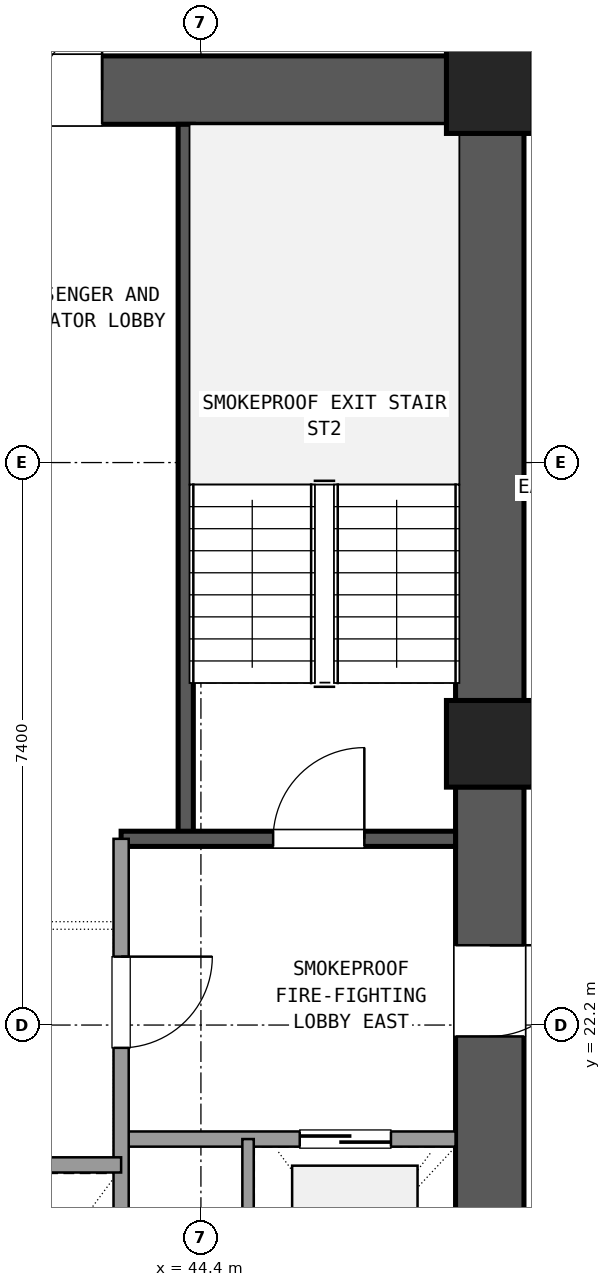
"""IFC4 building model, lengths in metres.
Left out: names, types, materials, properties, quantities, classifications, styles, units other than length and angle.
Written with IfcOpenShell. Run it as: python <this file> out.ifc"""

import sys

from ifc_helpers import new_model, si_unit, direction, frame, frame_2d, origin, origin_2d, place, context, subcontext, project, spatial, rectangle, extrude, element, fill, save


model = new_model("IFC4")
c1 = context("Model", 3, precision=1e-05, world=origin(), true_north=direction((0.0, 1.0)))
c2 = subcontext(c1, "Body", "Model", "MODEL_VIEW")
j1 = project(units=[si_unit("LENGTHUNIT", "METRE"), si_unit("PLANEANGLEUNIT", "RADIAN")], contexts=[c1])
p1 = place(None, origin())
s1 = spatial("IfcSite", under=j1, at=p1, CompositionType="ELEMENT")
p2 = place(p1, origin())
s2 = spatial("IfcBuilding", under=s1, at=p2, CompositionType="ELEMENT")
p3 = place(p2, frame((0.0, 0.0, 52.74)))
s3 = spatial("IfcBuildingStorey", under=s2, at=p3, CompositionType="ELEMENT", Elevation=52.74)
for number, where, z_axis, x_axis in (
    (1, (48.2, 25.9, 0.0), (0.0, 0.0, 1.0), (1.0, 0.0, 0.0)),
    (2, (48.2, 34.5, 0.0), (0.0, 0.0, 1.0), (1.0, 0.0, 0.0)),
):
    element("IfcColumn", number, at=place(p3, frame(where, z_axis=z_axis, x_axis=x_axis)), inside=s3, PredefinedType="COLUMN", context=c2, shape_type="SweptSolid", body=[
        extrude(rectangle(XDim=1.14, YDim=1.14, at=origin_2d()), origin(), (0.0, 0.0, 1.0), 3.6),
    ])
p4 = place(p3, frame((48.2, 17.865, 0.0), z_axis=(0.0, 0.0, 1.0), x_axis=(0.0, 1.0, 0.0)))
e3 = element("IfcWall", 3, at=p4, inside=s3, PredefinedType="SHEAR", context=c2, shape_type="SweptSolid", body=[
    extrude(rectangle(XDim=7.47, YDim=0.9, at=frame_2d((3.735, 0.0))), origin(), (0.0, 0.0, 1.0), 3.32),
])
p5 = place(p4, frame((4.185, 0.0, 0.0)))
e4 = element("IfcOpeningElement", 4, at=p5, cuts=e3, PredefinedType="OPENING", context=c2, shape_type="SweptSolid", body=[
    extrude(rectangle(XDim=1.2, YDim=2.15, at=frame_2d((0.6, 1.075))), frame((0.0, 0.46, 0.0), z_axis=(0.0, -1.0, 0.0), x_axis=(1.0, 0.0, 0.0)), (0.0, 0.0, 1.0), 0.92),
])
p6 = place(p3, frame((48.2, 26.465, 0.0), z_axis=(0.0, 0.0, 1.0), x_axis=(0.0, 1.0, 0.0)))
e5 = element("IfcWall", 5, at=p6, inside=s3, PredefinedType="SHEAR", context=c2, shape_type="SweptSolid", body=[
    extrude(rectangle(XDim=7.47, YDim=0.9, at=frame_2d((3.735, 0.0))), origin(), (0.0, 0.0, 1.0), 3.32),
])
p7 = place(p3, frame((47.635, 34.5, 0.0), z_axis=(0.0, 0.0, 1.0), x_axis=(-1.0, 0.0, 0.0)))
e6 = element("IfcWall", 6, at=p7, inside=s3, PredefinedType="SHEAR", context=c2, shape_type="SweptSolid", body=[
    extrude(rectangle(XDim=10.07, YDim=0.9, at=frame_2d((5.035, 0.0))), origin(), (0.0, 0.0, 1.0), 3.32),
])
p8 = place(p7, frame((4.535, 0.0, 0.0)))
e7 = element("IfcOpeningElement", 7, at=p8, cuts=e6, PredefinedType="OPENING", context=c2, shape_type="SweptSolid", body=[
    extrude(rectangle(XDim=1.6, YDim=2.2, at=frame_2d((0.8, 1.1))), frame((0.0, 0.46, 0.0), z_axis=(0.0, -1.0, 0.0), x_axis=(1.0, 0.0, 0.0)), (0.0, 0.0, 1.0), 0.92),
])
p9 = place(p3, frame((44.2, 24.65, 0.0), z_axis=(0.0, 0.0, 1.0), x_axis=(0.0, 1.0, 0.0)))
e8 = element("IfcWall", 8, at=p9, inside=s3, PredefinedType="SHEAR", context=c2, shape_type="SweptSolid", body=[
    extrude(rectangle(XDim=9.4, YDim=0.2, at=frame_2d((4.7, 0.0))), origin(), (0.0, 0.0, 1.0), 3.32),
])
p10 = place(p3, frame((43.35, 24.65, 0.0), z_axis=(0.0, 0.0, 1.0), x_axis=(1.0, 0.0, 0.0)))
e9 = element("IfcWall", 9, at=p10, inside=s3, PredefinedType="SHEAR", context=c2, shape_type="SweptSolid", body=[
    extrude(rectangle(XDim=4.4, YDim=0.2, at=frame_2d((2.2, 0.0))), origin(), (0.0, 0.0, 1.0), 3.32),
])
p11 = place(p10, frame((2.0, 0.0, 0.0)))
e10 = element("IfcOpeningElement", 10, at=p11, cuts=e9, PredefinedType="OPENING", context=c2, shape_type="SweptSolid", body=[
    extrude(rectangle(XDim=1.2, YDim=2.15, at=frame_2d((0.6, 1.075))), frame((0.0, 0.11, 0.0), z_axis=(0.0, -1.0, 0.0), x_axis=(1.0, 0.0, 0.0)), (0.0, 0.0, 1.0), 0.22),
])
p12 = place(p3, frame((43.35, 20.7, 0.0), z_axis=(0.0, 0.0, 1.0), x_axis=(1.0, 0.0, 0.0)))
e11 = element("IfcWall", 11, at=p12, inside=s3, PredefinedType="SOLIDWALL", context=c2, shape_type="SweptSolid", body=[
    extrude(rectangle(XDim=4.4, YDim=0.2, at=frame_2d((2.2, 0.0))), origin(), (0.0, 0.0, 1.0), 2.61),
])
p13 = place(p12, frame((2.35, 0.0, 0.0)))
e12 = element("IfcOpeningElement", 12, at=p13, cuts=e11, PredefinedType="OPENING", context=c2, shape_type="SweptSolid", body=[
    extrude(rectangle(XDim=1.2, YDim=2.15, at=frame_2d((0.6, 1.075))), frame((0.0, 0.11, 0.0), z_axis=(0.0, -1.0, 0.0), x_axis=(1.0, 0.0, 0.0)), (0.0, 0.0, 1.0), 0.22),
])
p14 = place(p3, frame((43.35, 17.75, 0.0), z_axis=(0.0, 0.0, 1.0), x_axis=(0.0, 1.0, 0.0)))
e13 = element("IfcWall", 13, at=p14, inside=s3, PredefinedType="SOLIDWALL", context=c2, shape_type="SweptSolid", body=[
    extrude(rectangle(XDim=6.9, YDim=0.2, at=frame_2d((3.45, 0.0))), origin(), (0.0, 0.0, 1.0), 2.61),
])
p15 = place(p14, frame((4.15, 0.0, 0.0)))
e14 = element("IfcOpeningElement", 14, at=p15, cuts=e13, PredefinedType="OPENING", context=c2, shape_type="SweptSolid", body=[
    extrude(rectangle(XDim=1.2, YDim=2.15, at=frame_2d((0.6, 1.075))), frame((0.0, 0.11, 0.0), z_axis=(0.0, -1.0, 0.0), x_axis=(1.0, 0.0, 0.0)), (0.0, 0.0, 1.0), 0.22),
])
p16 = place(p3, frame((45.02, 17.75, 0.0), z_axis=(0.0, 0.0, 1.0), x_axis=(0.0, 1.0, 0.0)))
e15 = element("IfcWall", 15, at=p16, inside=s3, PredefinedType="PARTITIONING", context=c2, shape_type="SweptSolid", body=[
    extrude(rectangle(XDim=2.95, YDim=0.15, at=frame_2d((1.475, 0.0))), origin(), (0.0, 0.0, 1.0), 2.61),
])
p17 = place(p3, frame((37.25, 20.36, 0.0), z_axis=(0.0, 0.0, 1.0), x_axis=(1.0, 0.0, 0.0)))
e16 = element("IfcWall", 16, at=p17, inside=s3, PredefinedType="SOLIDWALL", context=c2, shape_type="SweptSolid", body=[
    extrude(rectangle(XDim=6.1, YDim=0.2, at=frame_2d((3.05, 0.0))), origin(), (0.0, 0.0, 1.0), 2.61),
])
p18 = place(p11, origin())
e17 = element("IfcDoor", 17, at=p18, inside=s3, OperationType="SINGLE_SWING_RIGHT", PredefinedType="DOOR", context=c2, shape_type="SweptSolid", body=[
    extrude(rectangle(XDim=1.2, YDim=2.15, at=frame_2d((0.6, 1.075))), frame((0.0, 0.025, 0.0), z_axis=(0.0, -1.0, 0.0), x_axis=(1.0, 0.0, 0.0)), (0.0, 0.0, 1.0), 0.05),
])
fill(e10, e17)
p19 = place(p13, origin())
e18 = element("IfcDoor", 18, at=p19, inside=s3, OperationType="SLIDING_TO_RIGHT", PredefinedType="DOOR", context=c2, shape_type="SweptSolid", body=[
    extrude(rectangle(XDim=1.2, YDim=2.15, at=frame_2d((0.6, 1.075))), frame((0.0, 0.025, 0.0), z_axis=(0.0, -1.0, 0.0), x_axis=(1.0, 0.0, 0.0)), (0.0, 0.0, 1.0), 0.05),
])
fill(e12, e18)
p20 = place(p15, frame((1.2, 0.0, 0.0), z_axis=(0.0, 0.0, 1.0), x_axis=(-1.0, 0.0, 0.0)))
e19 = element("IfcDoor", 19, at=p20, inside=s3, OperationType="SINGLE_SWING_RIGHT", PredefinedType="DOOR", context=c2, shape_type="SweptSolid", body=[
    extrude(rectangle(XDim=1.2, YDim=2.15, at=frame_2d((0.6, 1.075))), frame((0.0, 0.025, 0.0), z_axis=(0.0, -1.0, 0.0), x_axis=(1.0, 0.0, 0.0)), (0.0, 0.0, 1.0), 0.05),
])
fill(e14, e19)
p21 = place(p5, frame((1.2, 0.0, 0.0), z_axis=(0.0, 0.0, 1.0), x_axis=(-1.0, 0.0, 0.0)))
e20 = element("IfcDoor", 20, at=p21, inside=s3, OperationType="SINGLE_SWING_RIGHT", PredefinedType="DOOR", context=c2, shape_type="SweptSolid", body=[
    extrude(rectangle(XDim=1.2, YDim=2.15, at=frame_2d((0.6, 1.075))), frame((0.0, 0.025, 0.0), z_axis=(0.0, -1.0, 0.0), x_axis=(1.0, 0.0, 0.0)), (0.0, 0.0, 1.0), 0.05),
])
fill(e4, e20)
p22 = place(p8, frame((1.6, 0.0, 0.0), z_axis=(0.0, 0.0, 1.0), x_axis=(-1.0, 0.0, 0.0)))
e21 = element("IfcDoor", 21, at=p22, inside=s3, OperationType="DOUBLE_DOOR_SINGLE_SWING", PredefinedType="DOOR", context=c2, shape_type="SweptSolid", body=[
    extrude(rectangle(XDim=1.6, YDim=2.2, at=frame_2d((0.8, 1.1))), frame((0.0, 0.025, 0.0), z_axis=(0.0, -1.0, 0.0), x_axis=(1.0, 0.0, 0.0)), (0.0, 0.0, 1.0), 0.05),
])
fill(e7, e21)
save(model, sys.argv[1])
